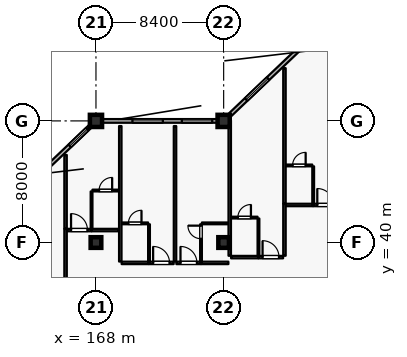
"""IFC4 building model, lengths in metres.
Left out: names, types, materials, properties, quantities, classifications, styles, units other than length and angle.
Written with IfcOpenShell. Run it as: python <this file> out.ifc"""

import sys

from ifc_helpers import new_model, si_unit, direction, frame, frame_2d, origin, origin_2d, place, context, subcontext, project, spatial, rectangle, extrude, element, fill, save


model = new_model("IFC4")
c1 = context("Model", 3, precision=1e-05, world=origin(), true_north=direction((0.0, 1.0)))
c2 = subcontext(c1, "Body", "Model", "MODEL_VIEW")
j1 = project(units=[si_unit("LENGTHUNIT", "METRE"), si_unit("PLANEANGLEUNIT", "RADIAN")], contexts=[c1])
p1 = place(None, origin())
s1 = spatial("IfcSite", under=j1, at=p1, CompositionType="ELEMENT")
p2 = place(p1, origin())
s2 = spatial("IfcBuilding", under=s1, at=p2, CompositionType="ELEMENT")
p3 = place(p2, frame((0.0, 0.0, 21.0)))
s3 = spatial("IfcBuildingStorey", under=s2, at=p3, CompositionType="ELEMENT", Elevation=21.0)
for number, where, z_axis, x_axis in (
    (1, (168.0, 48.0, 0.0), (0.0, 0.0, 1.0), (1.0, 0.0, 0.0)),
    (2, (176.4, 48.0, 0.0), (0.0, 0.0, 1.0), (1.0, 0.0, 0.0)),
):
    element("IfcColumn", number, at=place(p3, frame(where, z_axis=z_axis, x_axis=x_axis)), inside=s3, PredefinedType="COLUMN", context=c2, shape_type="SweptSolid", body=[
        extrude(rectangle(XDim=0.8, YDim=0.8, at=origin_2d()), origin(), (0.0, 0.0, 1.0), 4.2),
    ])
for number, where, z_axis, x_axis in (
    (3, (168.0, 40.0, 0.0), (0.0, 0.0, 1.0), (1.0, 0.0, 0.0)),
    (4, (176.4, 40.0, 0.0), (0.0, 0.0, 1.0), (1.0, 0.0, 0.0)),
):
    element("IfcColumn", number, at=place(p3, frame(where, z_axis=z_axis, x_axis=x_axis)), inside=s3, PredefinedType="COLUMN", context=c2, shape_type="SweptSolid", body=[
        extrude(rectangle(XDim=0.7, YDim=0.7, at=origin_2d()), origin(), (0.0, 0.0, 1.0), 4.2),
    ])
p4 = place(p3, frame((160.0, 40.381, 0.0), z_axis=(0.0, 0.0, 1.0), x_axis=(0.724156739794, 0.689635422677, 0.0)))
e5 = element("IfcWall", 5, at=p4, inside=s3, PredefinedType="SOLIDWALL", context=c2, shape_type="SweptSolid", body=[
    extrude(rectangle(XDim=10.495, YDim=0.24, at=frame_2d((5.248, 0.0))), origin(), (0.0, 0.0, 1.0), 3.53),
])
p5 = place(p4, frame((0.926, 0.0, 0.8)))
e6 = element("IfcOpeningElement", 6, at=p5, cuts=e5, PredefinedType="OPENING", context=c2, shape_type="SweptSolid", body=[
    extrude(rectangle(XDim=1.6, YDim=1.6, at=frame_2d((0.8, 0.8))), frame((0.0, 0.13, 0.0), z_axis=(0.0, -1.0, 0.0), x_axis=(1.0, 0.0, 0.0)), (0.0, 0.0, 1.0), 0.26),
])
p6 = place(p4, frame((5.138, 0.0, 0.8)))
e7 = element("IfcOpeningElement", 7, at=p6, cuts=e5, PredefinedType="OPENING", context=c2, shape_type="SweptSolid", body=[
    extrude(rectangle(XDim=1.6, YDim=1.6, at=frame_2d((0.8, 0.8))), frame((0.0, 0.13, 0.0), z_axis=(0.0, -1.0, 0.0), x_axis=(1.0, 0.0, 0.0)), (0.0, 0.0, 1.0), 0.26),
])
p7 = place(p4, frame((8.659, 0.0, 0.8)))
e8 = element("IfcOpeningElement", 8, at=p7, cuts=e5, PredefinedType="OPENING", context=c2, shape_type="SweptSolid", body=[
    extrude(rectangle(XDim=1.6, YDim=1.6, at=frame_2d((0.8, 0.8))), frame((0.0, 0.13, 0.0), z_axis=(0.0, -1.0, 0.0), x_axis=(1.0, 0.0, 0.0)), (0.0, 0.0, 1.0), 0.26),
])
p8 = place(p3, frame((168.4, 48.0, 0.0), z_axis=(0.0, 0.0, 1.0), x_axis=(1.0, 0.0, 0.0)))
e9 = element("IfcWall", 9, at=p8, inside=s3, PredefinedType="SOLIDWALL", context=c2, shape_type="SweptSolid", body=[
    extrude(rectangle(XDim=7.6, YDim=0.24, at=frame_2d((3.8, 0.0))), origin(), (0.0, 0.0, 1.0), 3.53),
])
p9 = place(p8, frame((2.0, 0.0, 0.8)))
e10 = element("IfcOpeningElement", 10, at=p9, cuts=e9, PredefinedType="OPENING", context=c2, shape_type="SweptSolid", body=[
    extrude(rectangle(XDim=2.0, YDim=1.75, at=frame_2d((1.0, 0.875))), frame((0.0, 0.13, 0.0), z_axis=(0.0, -1.0, 0.0), x_axis=(1.0, 0.0, 0.0)), (0.0, 0.0, 1.0), 0.26),
])
p10 = place(p8, frame((5.25, 0.0, 0.8)))
e11 = element("IfcOpeningElement", 11, at=p10, cuts=e9, PredefinedType="OPENING", context=c2, shape_type="SweptSolid", body=[
    extrude(rectangle(XDim=2.0, YDim=1.75, at=frame_2d((1.0, 0.875))), frame((0.0, 0.13, 0.0), z_axis=(0.0, -1.0, 0.0), x_axis=(1.0, 0.0, 0.0)), (0.0, 0.0, 1.0), 0.26),
])
p11 = place(p3, frame((176.8, 48.381, 0.0), z_axis=(0.0, 0.0, 1.0), x_axis=(0.724145676014, 0.689647040094, 0.0)))
e12 = element("IfcWall", 12, at=p11, inside=s3, PredefinedType="SOLIDWALL", context=c2, shape_type="SweptSolid", body=[
    extrude(rectangle(XDim=10.495, YDim=0.24, at=frame_2d((5.248, 0.0))), origin(), (0.0, 0.0, 1.0), 3.53),
])
p12 = place(p11, frame((1.486, 0.0, 0.8)))
e13 = element("IfcOpeningElement", 13, at=p12, cuts=e12, PredefinedType="OPENING", context=c2, shape_type="SweptSolid", body=[
    extrude(rectangle(XDim=2.0, YDim=1.75, at=frame_2d((1.0, 0.875))), frame((0.0, 0.13, 0.0), z_axis=(0.0, -1.0, 0.0), x_axis=(1.0, 0.0, 0.0)), (0.0, 0.0, 1.0), 0.26),
])
p13 = place(p11, frame((6.457, 0.0, 0.8)))
e14 = element("IfcOpeningElement", 14, at=p13, cuts=e12, PredefinedType="OPENING", context=c2, shape_type="SweptSolid", body=[
    extrude(rectangle(XDim=2.0, YDim=1.75, at=frame_2d((1.0, 0.875))), frame((0.0, 0.13, 0.0), z_axis=(0.0, -1.0, 0.0), x_axis=(1.0, 0.0, 0.0)), (0.0, 0.0, 1.0), 0.26),
])
p14 = place(p3, frame((166.0, 32.26, 0.0), z_axis=(0.0, 0.0, 1.0), x_axis=(0.0, 1.0, 0.0)))
e15 = element("IfcWall", 15, at=p14, inside=s3, PredefinedType="PARTITIONING", context=c2, shape_type="SweptSolid", body=[
    extrude(rectangle(XDim=8.64, YDim=0.16, at=frame_2d((4.32, 0.0))), origin(), (0.0, 0.0, 1.0), 3.965),
])
p15 = place(p3, frame((166.09, 40.82, 0.0), z_axis=(0.0, 0.0, 1.0), x_axis=(1.0, 0.0, 0.0)))
e16 = element("IfcWall", 16, at=p15, inside=s3, PredefinedType="PARTITIONING", context=c2, shape_type="SweptSolid", body=[
    extrude(rectangle(XDim=1.62, YDim=0.16, at=frame_2d((0.81, 0.0))), origin(), (0.0, 0.0, 1.0), 3.965),
])
p16 = place(p15, frame((0.27, 0.0, 0.0)))
e17 = element("IfcOpeningElement", 17, at=p16, cuts=e16, PredefinedType="OPENING", context=c2, shape_type="SweptSolid", body=[
    extrude(rectangle(XDim=1.08, YDim=2.3, at=frame_2d((0.54, 1.15))), frame((0.0, 0.09, 0.0), z_axis=(0.0, -1.0, 0.0), x_axis=(1.0, 0.0, 0.0)), (0.0, 0.0, 1.0), 0.18),
])
p17 = place(p3, frame((167.72, 40.82, 0.0), z_axis=(0.0, 0.0, 1.0), x_axis=(1.0, 0.0, 0.0)))
e18 = element("IfcWall", 18, at=p17, inside=s3, PredefinedType="PARTITIONING", context=c2, shape_type="SweptSolid", body=[
    extrude(rectangle(XDim=1.79, YDim=0.16, at=frame_2d((0.895, 0.0))), origin(), (0.0, 0.0, 1.0), 3.965),
])
p18 = place(p3, frame((167.71, 40.91, 0.0), z_axis=(0.0, 0.0, 1.0), x_axis=(0.0, 1.0, 0.0)))
e19 = element("IfcWall", 19, at=p18, inside=s3, PredefinedType="PARTITIONING", context=c2, shape_type="SweptSolid", body=[
    extrude(rectangle(XDim=2.45, YDim=0.115, at=frame_2d((1.225, 0.0))), origin(), (0.0, 0.0, 1.0), 3.965),
])
p19 = place(p3, frame((167.77, 43.42, 0.0), z_axis=(0.0, 0.0, 1.0), x_axis=(1.0, 0.0, 0.0)))
e20 = element("IfcWall", 20, at=p19, inside=s3, PredefinedType="PARTITIONING", context=c2, shape_type="SweptSolid", body=[
    extrude(rectangle(XDim=1.73, YDim=0.115, at=frame_2d((0.865, 0.0))), origin(), (0.0, 0.0, 1.0), 3.965),
])
p20 = place(p19, frame((0.435, 0.0, 0.0)))
e21 = element("IfcOpeningElement", 21, at=p20, cuts=e20, PredefinedType="OPENING", context=c2, shape_type="SweptSolid", body=[
    extrude(rectangle(XDim=0.86, YDim=2.12, at=frame_2d((0.43, 1.06))), frame((0.0, 0.067, 0.0), z_axis=(0.0, -1.0, 0.0), x_axis=(1.0, 0.0, 0.0)), (0.0, 0.0, 1.0), 0.135),
])
p21 = place(p3, frame((166.0, 40.91, 0.0), z_axis=(0.0, 0.0, 1.0), x_axis=(0.0, 1.0, 0.0)))
e22 = element("IfcWall", 22, at=p21, inside=s3, PredefinedType="PARTITIONING", context=c2, shape_type="SweptSolid", body=[
    extrude(rectangle(XDim=4.85, YDim=0.16, at=frame_2d((2.425, 0.0))), origin(), (0.0, 0.0, 1.0), 3.965),
])
p22 = place(p3, frame((169.69, 38.66, 0.0), z_axis=(0.0, 0.0, 1.0), x_axis=(1.0, 0.0, 0.0)))
e23 = element("IfcWall", 23, at=p22, inside=s3, PredefinedType="PARTITIONING", context=c2, shape_type="SweptSolid", body=[
    extrude(rectangle(XDim=1.79, YDim=0.16, at=frame_2d((0.895, 0.0))), origin(), (0.0, 0.0, 1.0), 3.965),
])
p23 = place(p3, frame((171.49, 38.66, 0.0), z_axis=(0.0, 0.0, 1.0), x_axis=(1.0, 0.0, 0.0)))
e24 = element("IfcWall", 24, at=p23, inside=s3, PredefinedType="PARTITIONING", context=c2, shape_type="SweptSolid", body=[
    extrude(rectangle(XDim=1.62, YDim=0.16, at=frame_2d((0.81, 0.0))), origin(), (0.0, 0.0, 1.0), 3.965),
])
p24 = place(p23, frame((0.27, 0.0, 0.0)))
e25 = element("IfcOpeningElement", 25, at=p24, cuts=e24, PredefinedType="OPENING", context=c2, shape_type="SweptSolid", body=[
    extrude(rectangle(XDim=1.08, YDim=2.3, at=frame_2d((0.54, 1.15))), frame((0.0, 0.09, 0.0), z_axis=(0.0, -1.0, 0.0), x_axis=(1.0, 0.0, 0.0)), (0.0, 0.0, 1.0), 0.18),
])
p25 = place(p3, frame((171.49, 38.75, 0.0), z_axis=(0.0, 0.0, 1.0), x_axis=(0.0, 1.0, 0.0)))
e26 = element("IfcWall", 26, at=p25, inside=s3, PredefinedType="PARTITIONING", context=c2, shape_type="SweptSolid", body=[
    extrude(rectangle(XDim=2.45, YDim=0.115, at=frame_2d((1.225, 0.0))), origin(), (0.0, 0.0, 1.0), 3.965),
])
p26 = place(p3, frame((169.7, 41.26, 0.0), z_axis=(0.0, 0.0, 1.0), x_axis=(1.0, 0.0, 0.0)))
e27 = element("IfcWall", 27, at=p26, inside=s3, PredefinedType="PARTITIONING", context=c2, shape_type="SweptSolid", body=[
    extrude(rectangle(XDim=1.73, YDim=0.115, at=frame_2d((0.865, 0.0))), origin(), (0.0, 0.0, 1.0), 3.965),
])
p27 = place(p26, frame((0.435, 0.0, 0.0)))
e28 = element("IfcOpeningElement", 28, at=p27, cuts=e27, PredefinedType="OPENING", context=c2, shape_type="SweptSolid", body=[
    extrude(rectangle(XDim=0.86, YDim=2.12, at=frame_2d((0.43, 1.06))), frame((0.0, 0.067, 0.0), z_axis=(0.0, -1.0, 0.0), x_axis=(1.0, 0.0, 0.0)), (0.0, 0.0, 1.0), 0.135),
])
p28 = place(p3, frame((169.6, 38.75, 0.0), z_axis=(0.0, 0.0, 1.0), x_axis=(0.0, 1.0, 0.0)))
e29 = element("IfcWall", 29, at=p28, inside=s3, PredefinedType="PARTITIONING", context=c2, shape_type="SweptSolid", body=[
    extrude(rectangle(XDim=8.91, YDim=0.16, at=frame_2d((4.455, 0.0))), origin(), (0.0, 0.0, 1.0), 3.965),
])
p29 = place(p3, frame((173.29, 38.66, 0.0), z_axis=(0.0, 0.0, 1.0), x_axis=(1.0, 0.0, 0.0)))
e30 = element("IfcWall", 30, at=p29, inside=s3, PredefinedType="PARTITIONING", context=c2, shape_type="SweptSolid", body=[
    extrude(rectangle(XDim=1.62, YDim=0.16, at=frame_2d((0.81, 0.0))), origin(), (0.0, 0.0, 1.0), 3.965),
])
p30 = place(p29, frame((0.27, 0.0, 0.0)))
e31 = element("IfcOpeningElement", 31, at=p30, cuts=e30, PredefinedType="OPENING", context=c2, shape_type="SweptSolid", body=[
    extrude(rectangle(XDim=1.08, YDim=2.3, at=frame_2d((0.54, 1.15))), frame((0.0, 0.09, 0.0), z_axis=(0.0, -1.0, 0.0), x_axis=(1.0, 0.0, 0.0)), (0.0, 0.0, 1.0), 0.18),
])
p31 = place(p3, frame((174.92, 38.66, 0.0), z_axis=(0.0, 0.0, 1.0), x_axis=(1.0, 0.0, 0.0)))
e32 = element("IfcWall", 32, at=p31, inside=s3, PredefinedType="PARTITIONING", context=c2, shape_type="SweptSolid", body=[
    extrude(rectangle(XDim=1.79, YDim=0.16, at=frame_2d((0.895, 0.0))), origin(), (0.0, 0.0, 1.0), 3.965),
])
p32 = place(p3, frame((174.91, 38.75, 0.0), z_axis=(0.0, 0.0, 1.0), x_axis=(0.0, 1.0, 0.0)))
e33 = element("IfcWall", 33, at=p32, inside=s3, PredefinedType="PARTITIONING", context=c2, shape_type="SweptSolid", body=[
    extrude(rectangle(XDim=2.45, YDim=0.115, at=frame_2d((1.225, 0.0))), origin(), (0.0, 0.0, 1.0), 3.965),
])
p33 = place(p32, frame((1.5, 0.0, 0.0)))
e34 = element("IfcOpeningElement", 34, at=p33, cuts=e33, PredefinedType="OPENING", context=c2, shape_type="SweptSolid", body=[
    extrude(rectangle(XDim=0.86, YDim=2.12, at=frame_2d((0.43, 1.06))), frame((0.0, 0.067, 0.0), z_axis=(0.0, -1.0, 0.0), x_axis=(1.0, 0.0, 0.0)), (0.0, 0.0, 1.0), 0.135),
])
p34 = place(p3, frame((174.97, 41.26, 0.0), z_axis=(0.0, 0.0, 1.0), x_axis=(1.0, 0.0, 0.0)))
e35 = element("IfcWall", 35, at=p34, inside=s3, PredefinedType="PARTITIONING", context=c2, shape_type="SweptSolid", body=[
    extrude(rectangle(XDim=1.73, YDim=0.115, at=frame_2d((0.865, 0.0))), origin(), (0.0, 0.0, 1.0), 3.965),
])
p35 = place(p3, frame((173.2, 38.75, 0.0), z_axis=(0.0, 0.0, 1.0), x_axis=(0.0, 1.0, 0.0)))
e36 = element("IfcWall", 36, at=p35, inside=s3, PredefinedType="PARTITIONING", context=c2, shape_type="SweptSolid", body=[
    extrude(rectangle(XDim=8.91, YDim=0.16, at=frame_2d((4.455, 0.0))), origin(), (0.0, 0.0, 1.0), 3.965),
])
p36 = place(p3, frame((176.89, 39.04, 0.0), z_axis=(0.0, 0.0, 1.0), x_axis=(1.0, 0.0, 0.0)))
e37 = element("IfcWall", 37, at=p36, inside=s3, PredefinedType="PARTITIONING", context=c2, shape_type="SweptSolid", body=[
    extrude(rectangle(XDim=1.79, YDim=0.16, at=frame_2d((0.895, 0.0))), origin(), (0.0, 0.0, 1.0), 3.965),
])
p37 = place(p3, frame((178.69, 39.04, 0.0), z_axis=(0.0, 0.0, 1.0), x_axis=(1.0, 0.0, 0.0)))
e38 = element("IfcWall", 38, at=p37, inside=s3, PredefinedType="PARTITIONING", context=c2, shape_type="SweptSolid", body=[
    extrude(rectangle(XDim=1.62, YDim=0.16, at=frame_2d((0.81, 0.0))), origin(), (0.0, 0.0, 1.0), 3.965),
])
p38 = place(p37, frame((0.27, 0.0, 0.0)))
e39 = element("IfcOpeningElement", 39, at=p38, cuts=e38, PredefinedType="OPENING", context=c2, shape_type="SweptSolid", body=[
    extrude(rectangle(XDim=1.08, YDim=2.3, at=frame_2d((0.54, 1.15))), frame((0.0, 0.09, 0.0), z_axis=(0.0, -1.0, 0.0), x_axis=(1.0, 0.0, 0.0)), (0.0, 0.0, 1.0), 0.18),
])
p39 = place(p3, frame((178.69, 39.13, 0.0), z_axis=(0.0, 0.0, 1.0), x_axis=(0.0, 1.0, 0.0)))
e40 = element("IfcWall", 40, at=p39, inside=s3, PredefinedType="PARTITIONING", context=c2, shape_type="SweptSolid", body=[
    extrude(rectangle(XDim=2.45, YDim=0.115, at=frame_2d((1.225, 0.0))), origin(), (0.0, 0.0, 1.0), 3.965),
])
p40 = place(p3, frame((176.9, 41.64, 0.0), z_axis=(0.0, 0.0, 1.0), x_axis=(1.0, 0.0, 0.0)))
e41 = element("IfcWall", 41, at=p40, inside=s3, PredefinedType="PARTITIONING", context=c2, shape_type="SweptSolid", body=[
    extrude(rectangle(XDim=1.73, YDim=0.115, at=frame_2d((0.865, 0.0))), origin(), (0.0, 0.0, 1.0), 3.965),
])
p41 = place(p40, frame((0.435, 0.0, 0.0)))
e42 = element("IfcOpeningElement", 42, at=p41, cuts=e41, PredefinedType="OPENING", context=c2, shape_type="SweptSolid", body=[
    extrude(rectangle(XDim=0.86, YDim=2.12, at=frame_2d((0.43, 1.06))), frame((0.0, 0.067, 0.0), z_axis=(0.0, -1.0, 0.0), x_axis=(1.0, 0.0, 0.0)), (0.0, 0.0, 1.0), 0.135),
])
p42 = place(p3, frame((176.8, 39.13, 0.0), z_axis=(0.0, 0.0, 1.0), x_axis=(0.0, 1.0, 0.0)))
e43 = element("IfcWall", 43, at=p42, inside=s3, PredefinedType="PARTITIONING", context=c2, shape_type="SweptSolid", body=[
    extrude(rectangle(XDim=8.91, YDim=0.16, at=frame_2d((4.455, 0.0))), origin(), (0.0, 0.0, 1.0), 3.965),
])
p43 = place(p3, frame((180.4, 39.13, 0.0), z_axis=(0.0, 0.0, 1.0), x_axis=(0.0, 1.0, 0.0)))
e44 = element("IfcWall", 44, at=p43, inside=s3, PredefinedType="PARTITIONING", context=c2, shape_type="SweptSolid", body=[
    extrude(rectangle(XDim=3.42, YDim=0.16, at=frame_2d((1.71, 0.0))), origin(), (0.0, 0.0, 1.0), 3.965),
])
p44 = place(p3, frame((180.49, 42.47, 0.0), z_axis=(0.0, 0.0, 1.0), x_axis=(1.0, 0.0, 0.0)))
e45 = element("IfcWall", 45, at=p44, inside=s3, PredefinedType="PARTITIONING", context=c2, shape_type="SweptSolid", body=[
    extrude(rectangle(XDim=1.79, YDim=0.16, at=frame_2d((0.895, 0.0))), origin(), (0.0, 0.0, 1.0), 3.965),
])
p45 = place(p3, frame((182.29, 42.47, 0.0), z_axis=(0.0, 0.0, 1.0), x_axis=(1.0, 0.0, 0.0)))
e46 = element("IfcWall", 46, at=p45, inside=s3, PredefinedType="PARTITIONING", context=c2, shape_type="SweptSolid", body=[
    extrude(rectangle(XDim=1.62, YDim=0.16, at=frame_2d((0.81, 0.0))), origin(), (0.0, 0.0, 1.0), 3.965),
])
p46 = place(p45, frame((0.27, 0.0, 0.0)))
e47 = element("IfcOpeningElement", 47, at=p46, cuts=e46, PredefinedType="OPENING", context=c2, shape_type="SweptSolid", body=[
    extrude(rectangle(XDim=1.08, YDim=2.3, at=frame_2d((0.54, 1.15))), frame((0.0, 0.09, 0.0), z_axis=(0.0, -1.0, 0.0), x_axis=(1.0, 0.0, 0.0)), (0.0, 0.0, 1.0), 0.18),
])
p47 = place(p3, frame((182.29, 42.56, 0.0), z_axis=(0.0, 0.0, 1.0), x_axis=(0.0, 1.0, 0.0)))
e48 = element("IfcWall", 48, at=p47, inside=s3, PredefinedType="PARTITIONING", context=c2, shape_type="SweptSolid", body=[
    extrude(rectangle(XDim=2.45, YDim=0.115, at=frame_2d((1.225, 0.0))), origin(), (0.0, 0.0, 1.0), 3.965),
])
p48 = place(p3, frame((180.5, 45.07, 0.0), z_axis=(0.0, 0.0, 1.0), x_axis=(1.0, 0.0, 0.0)))
e49 = element("IfcWall", 49, at=p48, inside=s3, PredefinedType="PARTITIONING", context=c2, shape_type="SweptSolid", body=[
    extrude(rectangle(XDim=1.73, YDim=0.115, at=frame_2d((0.865, 0.0))), origin(), (0.0, 0.0, 1.0), 3.965),
])
p49 = place(p48, frame((0.435, 0.0, 0.0)))
e50 = element("IfcOpeningElement", 50, at=p49, cuts=e49, PredefinedType="OPENING", context=c2, shape_type="SweptSolid", body=[
    extrude(rectangle(XDim=0.86, YDim=2.12, at=frame_2d((0.43, 1.06))), frame((0.0, 0.067, 0.0), z_axis=(0.0, -1.0, 0.0), x_axis=(1.0, 0.0, 0.0)), (0.0, 0.0, 1.0), 0.135),
])
p50 = place(p3, frame((180.4, 42.56, 0.0), z_axis=(0.0, 0.0, 1.0), x_axis=(0.0, 1.0, 0.0)))
e51 = element("IfcWall", 51, at=p50, inside=s3, PredefinedType="PARTITIONING", context=c2, shape_type="SweptSolid", body=[
    extrude(rectangle(XDim=8.91, YDim=0.16, at=frame_2d((4.455, 0.0))), origin(), (0.0, 0.0, 1.0), 3.965),
])
p51 = place(p7, origin())
e52 = element("IfcWindow", 52, at=p51, inside=s3, PartitioningType="SINGLE_PANEL", PredefinedType="WINDOW", context=c2, shape_type="SweptSolid", body=[
    extrude(rectangle(XDim=1.6, YDim=1.6, at=frame_2d((0.8, 0.8))), frame((0.0, 0.03, 0.0), z_axis=(0.0, -1.0, 0.0), x_axis=(1.0, 0.0, 0.0)), (0.0, 0.0, 1.0), 0.06),
])
fill(e8, e52)
p52 = place(p9, origin())
e53 = element("IfcWindow", 53, at=p52, inside=s3, PartitioningType="DOUBLE_PANEL_VERTICAL", PredefinedType="WINDOW", context=c2, shape_type="SweptSolid", body=[
    extrude(rectangle(XDim=2.0, YDim=1.75, at=frame_2d((1.0, 0.875))), frame((0.0, 0.03, 0.0), z_axis=(0.0, -1.0, 0.0), x_axis=(1.0, 0.0, 0.0)), (0.0, 0.0, 1.0), 0.06),
])
fill(e10, e53)
p53 = place(p10, origin())
e54 = element("IfcWindow", 54, at=p53, inside=s3, PartitioningType="DOUBLE_PANEL_VERTICAL", PredefinedType="WINDOW", context=c2, shape_type="SweptSolid", body=[
    extrude(rectangle(XDim=2.0, YDim=1.75, at=frame_2d((1.0, 0.875))), frame((0.0, 0.03, 0.0), z_axis=(0.0, -1.0, 0.0), x_axis=(1.0, 0.0, 0.0)), (0.0, 0.0, 1.0), 0.06),
])
fill(e11, e54)
p54 = place(p12, origin())
e55 = element("IfcWindow", 55, at=p54, inside=s3, PartitioningType="DOUBLE_PANEL_VERTICAL", PredefinedType="WINDOW", context=c2, shape_type="SweptSolid", body=[
    extrude(rectangle(XDim=2.0, YDim=1.75, at=frame_2d((1.0, 0.875))), frame((0.0, 0.03, 0.0), z_axis=(0.0, -1.0, 0.0), x_axis=(1.0, 0.0, 0.0)), (0.0, 0.0, 1.0), 0.06),
])
fill(e13, e55)
p55 = place(p16, origin())
e56 = element("IfcDoor", 56, at=p55, inside=s3, OperationType="SINGLE_SWING_LEFT", PredefinedType="DOOR", context=c2, shape_type="SweptSolid", body=[
    extrude(rectangle(XDim=1.08, YDim=2.3, at=frame_2d((0.54, 1.15))), frame((0.0, 0.025, 0.0), z_axis=(0.0, -1.0, 0.0), x_axis=(1.0, 0.0, 0.0)), (0.0, 0.0, 1.0), 0.05),
])
fill(e17, e56)
p56 = place(p20, origin())
e57 = element("IfcDoor", 57, at=p56, inside=s3, OperationType="SINGLE_SWING_RIGHT", PredefinedType="DOOR", context=c2, shape_type="SweptSolid", body=[
    extrude(rectangle(XDim=0.86, YDim=2.12, at=frame_2d((0.43, 1.06))), frame((0.0, 0.025, 0.0), z_axis=(0.0, -1.0, 0.0), x_axis=(1.0, 0.0, 0.0)), (0.0, 0.0, 1.0), 0.05),
])
fill(e21, e57)
p57 = place(p24, origin())
e58 = element("IfcDoor", 58, at=p57, inside=s3, OperationType="SINGLE_SWING_LEFT", PredefinedType="DOOR", context=c2, shape_type="SweptSolid", body=[
    extrude(rectangle(XDim=1.08, YDim=2.3, at=frame_2d((0.54, 1.15))), frame((0.0, 0.025, 0.0), z_axis=(0.0, -1.0, 0.0), x_axis=(1.0, 0.0, 0.0)), (0.0, 0.0, 1.0), 0.05),
])
fill(e25, e58)
p58 = place(p27, origin())
e59 = element("IfcDoor", 59, at=p58, inside=s3, OperationType="SINGLE_SWING_RIGHT", PredefinedType="DOOR", context=c2, shape_type="SweptSolid", body=[
    extrude(rectangle(XDim=0.86, YDim=2.12, at=frame_2d((0.43, 1.06))), frame((0.0, 0.025, 0.0), z_axis=(0.0, -1.0, 0.0), x_axis=(1.0, 0.0, 0.0)), (0.0, 0.0, 1.0), 0.05),
])
fill(e28, e59)
p59 = place(p30, origin())
e60 = element("IfcDoor", 60, at=p59, inside=s3, OperationType="SINGLE_SWING_LEFT", PredefinedType="DOOR", context=c2, shape_type="SweptSolid", body=[
    extrude(rectangle(XDim=1.08, YDim=2.3, at=frame_2d((0.54, 1.15))), frame((0.0, 0.025, 0.0), z_axis=(0.0, -1.0, 0.0), x_axis=(1.0, 0.0, 0.0)), (0.0, 0.0, 1.0), 0.05),
])
fill(e31, e60)
p60 = place(p33, origin())
e61 = element("IfcDoor", 61, at=p60, inside=s3, OperationType="SINGLE_SWING_RIGHT", PredefinedType="DOOR", context=c2, shape_type="SweptSolid", body=[
    extrude(rectangle(XDim=0.86, YDim=2.12, at=frame_2d((0.43, 1.06))), frame((0.0, 0.025, 0.0), z_axis=(0.0, -1.0, 0.0), x_axis=(1.0, 0.0, 0.0)), (0.0, 0.0, 1.0), 0.05),
])
fill(e34, e61)
p61 = place(p38, origin())
e62 = element("IfcDoor", 62, at=p61, inside=s3, OperationType="SINGLE_SWING_LEFT", PredefinedType="DOOR", context=c2, shape_type="SweptSolid", body=[
    extrude(rectangle(XDim=1.08, YDim=2.3, at=frame_2d((0.54, 1.15))), frame((0.0, 0.025, 0.0), z_axis=(0.0, -1.0, 0.0), x_axis=(1.0, 0.0, 0.0)), (0.0, 0.0, 1.0), 0.05),
])
fill(e39, e62)
p62 = place(p41, origin())
e63 = element("IfcDoor", 63, at=p62, inside=s3, OperationType="SINGLE_SWING_RIGHT", PredefinedType="DOOR", context=c2, shape_type="SweptSolid", body=[
    extrude(rectangle(XDim=0.86, YDim=2.12, at=frame_2d((0.43, 1.06))), frame((0.0, 0.025, 0.0), z_axis=(0.0, -1.0, 0.0), x_axis=(1.0, 0.0, 0.0)), (0.0, 0.0, 1.0), 0.05),
])
fill(e42, e63)
p63 = place(p46, origin())
e64 = element("IfcDoor", 64, at=p63, inside=s3, OperationType="SINGLE_SWING_LEFT", PredefinedType="DOOR", context=c2, shape_type="SweptSolid", body=[
    extrude(rectangle(XDim=1.08, YDim=2.3, at=frame_2d((0.54, 1.15))), frame((0.0, 0.025, 0.0), z_axis=(0.0, -1.0, 0.0), x_axis=(1.0, 0.0, 0.0)), (0.0, 0.0, 1.0), 0.05),
])
fill(e47, e64)
p64 = place(p49, origin())
e65 = element("IfcDoor", 65, at=p64, inside=s3, OperationType="SINGLE_SWING_RIGHT", PredefinedType="DOOR", context=c2, shape_type="SweptSolid", body=[
    extrude(rectangle(XDim=0.86, YDim=2.12, at=frame_2d((0.43, 1.06))), frame((0.0, 0.025, 0.0), z_axis=(0.0, -1.0, 0.0), x_axis=(1.0, 0.0, 0.0)), (0.0, 0.0, 1.0), 0.05),
])
fill(e50, e65)
save(model, sys.argv[1])
